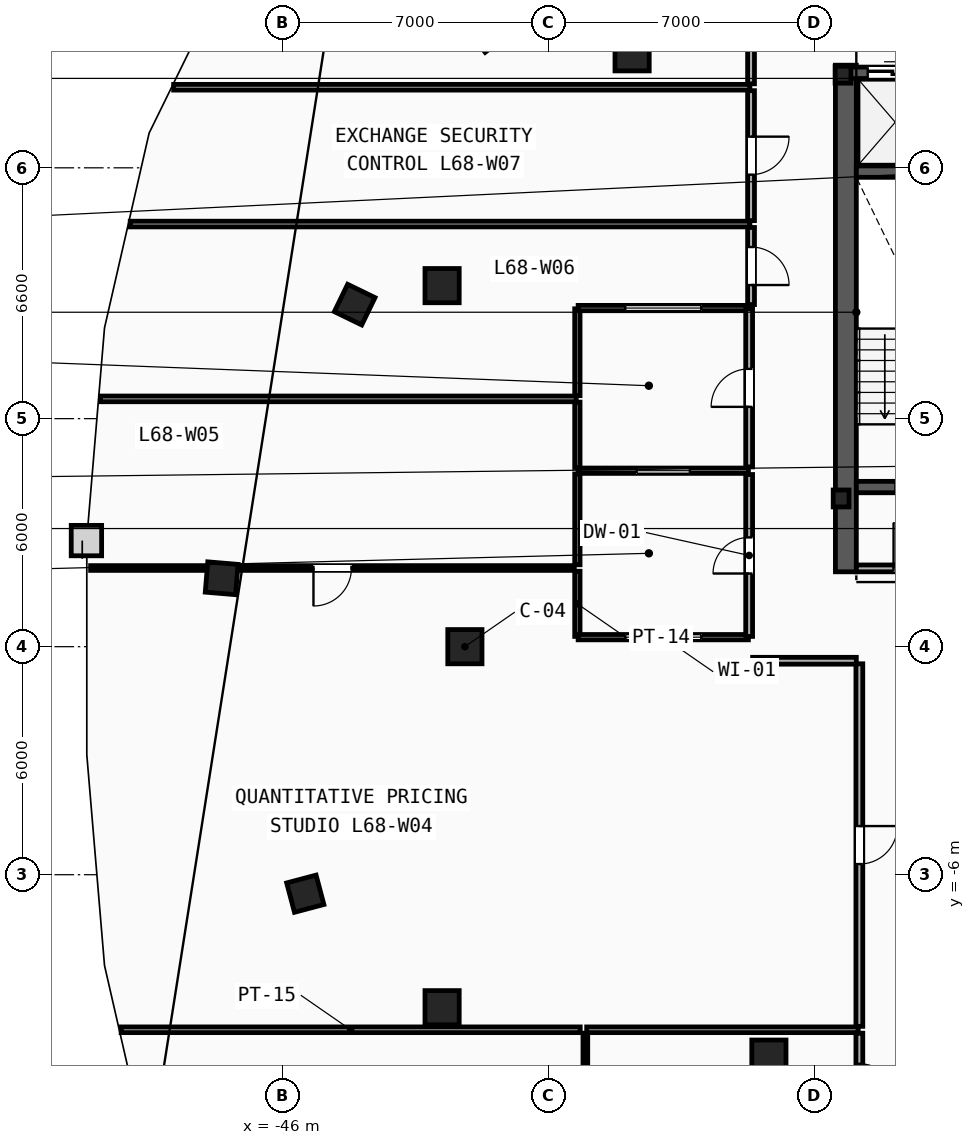
"""IFC4 building model, lengths in metres.
Left out: names, types, materials, properties, quantities, classifications, styles, units other than length and angle.
Written with IfcOpenShell. Run it as: python <this file> out.ifc"""

import sys

from ifc_helpers import new_model, si_unit, direction, frame, frame_2d, origin, origin_2d, place, context, subcontext, project, spatial, rectangle, i_section, extrude, element, fill, save


model = new_model("IFC4")
c1 = context("Model", 3, precision=1e-05, world=origin(), true_north=direction((0.0, 1.0)))
c2 = subcontext(c1, "Body", "Model", "MODEL_VIEW")
j1 = project(units=[si_unit("LENGTHUNIT", "METRE"), si_unit("PLANEANGLEUNIT", "RADIAN")], contexts=[c1])
p1 = place(None, origin())
s1 = spatial("IfcSite", under=j1, at=p1, CompositionType="ELEMENT")
p2 = place(p1, origin())
s2 = spatial("IfcBuilding", under=s1, at=p2, CompositionType="ELEMENT")
p3 = place(p2, frame((0.0, 0.0, 257.6)))
s3 = spatial("IfcBuildingStorey", under=s2, at=p3, CompositionType="ELEMENT", Elevation=257.6)
for number, where, z_axis, x_axis in (
    (1, (-31.3, 3.9, 0.0), (0.0, 0.0, 1.0), (1.0, 0.0, 0.0)),
    (2, (-31.25, 15.05, 0.0), (0.0, 0.0, 1.0), (1.0, 0.0, 0.0)),
):
    element("IfcColumn", number, at=place(p3, frame(where, z_axis=z_axis, x_axis=x_axis)), inside=s3, PredefinedType="COLUMN", context=c2, shape_type="SweptSolid", body=[
        extrude(i_section(OverallWidth=0.416, OverallDepth=0.446, WebThickness=0.039, FlangeThickness=0.063, FilletRadius=0.018, at=origin_2d()), origin(), (0.0, 0.0, 1.0), 3.6),
    ])
for number, where, z_axis, x_axis in (
    (3, (-41.2, 0.0, 0.0), (0.0, 0.0, 1.0), (1.0, 0.0, 0.0)),
    (4, (-41.8, 9.5, 0.0), (0.0, 0.0, 1.0), (1.0, 0.0, 0.0)),
    (5, (-36.8, 15.6, 0.0), (0.0, 0.0, 1.0), (1.0, 0.0, 0.0)),
    (6, (-41.8, -9.5, 0.0), (0.0, 0.0, 1.0), (1.0, 0.0, 0.0)),
    (7, (-33.2, -10.8, 0.0), (0.0, 0.0, 1.0), (1.0, 0.0, 0.0)),
):
    element("IfcColumn", number, at=place(p3, frame(where, z_axis=z_axis, x_axis=x_axis)), inside=s3, PredefinedType="COLUMN", context=c2, shape_type="SweptSolid", body=[
        extrude(rectangle(XDim=0.9, YDim=0.9, at=origin_2d()), origin(), (0.0, 0.0, 1.0), 3.6),
    ])
for number, where, z_axis, x_axis in (
    (8, (-40.6, 16.2, 0.0), (0.0, 0.0, 1.0), (-0.785, -0.619, 0.0)),
    (9, (-44.1, 9.0, 0.0), (0.0, 0.0, 1.0), (-0.437, -0.899, 0.0)),
    (10, (-47.6, 1.8, 0.0), (0.0, 0.0, 1.0), (-0.084, -0.997, 0.0)),
    (11, (-45.4, -6.5, 0.0), (0.0, 0.0, 1.0), (0.256, -0.967, 0.0)),
):
    element("IfcColumn", number, at=place(p3, frame(where, z_axis=z_axis, x_axis=x_axis)), inside=s3, PredefinedType="COLUMN", context=c2, shape_type="SweptSolid", body=[
        extrude(rectangle(XDim=0.8, YDim=0.8, at=origin_2d()), origin(), (0.0, 0.0, 1.0), 3.6),
    ])
p4 = place(p3, frame((-31.175, 1.97, 0.0), z_axis=(0.0, 0.0, 1.0), x_axis=(0.0, 1.0, 0.0)))
e12 = element("IfcWall", 12, at=p4, inside=s3, PredefinedType="SHEAR", context=c2, shape_type="SweptSolid", body=[
    extrude(rectangle(XDim=13.33, YDim=0.55, at=frame_2d((6.665, 0.0))), origin(), (0.0, 0.0, 1.0), 3.34),
])
p5 = place(p3, frame((-30.9, 4.2, 0.0), z_axis=(0.0, 0.0, 1.0), x_axis=(1.0, 0.0, 0.0)))
e13 = element("IfcWall", 13, at=p5, inside=s3, PredefinedType="SHEAR", context=c2, shape_type="SweptSolid", body=[
    extrude(rectangle(XDim=3.16, YDim=0.3, at=frame_2d((1.58, 0.0))), origin(), (0.0, 0.0, 1.0), 3.34),
])
p6 = place(p5, frame((1.03, 0.0, 0.0)))
e14 = element("IfcOpeningElement", 14, at=p6, cuts=e13, PredefinedType="OPENING", context=c2, shape_type="SweptSolid", body=[
    extrude(rectangle(XDim=1.1, YDim=2.15, at=frame_2d((0.55, 1.075))), frame((0.0, 0.16, 0.0), z_axis=(0.0, -1.0, 0.0), x_axis=(1.0, 0.0, 0.0)), (0.0, 0.0, 1.0), 0.32),
])
p7 = place(p3, frame((-30.9, 12.5, 0.0), z_axis=(0.0, 0.0, 1.0), x_axis=(1.0, 0.0, 0.0)))
e15 = element("IfcWall", 15, at=p7, inside=s3, PredefinedType="SHEAR", context=c2, shape_type="SweptSolid", body=[
    extrude(rectangle(XDim=3.16, YDim=0.3, at=frame_2d((1.58, 0.0))), origin(), (0.0, 0.0, 1.0), 3.34),
])
p8 = place(p3, frame((-30.9, 2.06, 0.0), z_axis=(0.0, 0.0, 1.0), x_axis=(1.0, 0.0, 0.0)))
e16 = element("IfcWall", 16, at=p8, inside=s3, PredefinedType="PARTITIONING", context=c2, shape_type="SweptSolid", body=[
    extrude(rectangle(XDim=3.16, YDim=0.18, at=frame_2d((1.58, 0.0))), origin(), (0.0, 0.0, 1.0), 3.34),
])
p9 = place(p8, frame((0.98, 0.0, 0.0)))
e17 = element("IfcOpeningElement", 17, at=p9, cuts=e16, PredefinedType="OPENING", context=c2, shape_type="SweptSolid", body=[
    extrude(rectangle(XDim=1.2, YDim=2.15, at=frame_2d((0.6, 1.075))), frame((0.0, 0.1, 0.0), z_axis=(0.0, -1.0, 0.0), x_axis=(1.0, 0.0, 0.0)), (0.0, 0.0, 1.0), 0.2),
])
p10 = place(p3, frame((-31.2, 15.1, 0.0), z_axis=(0.0, 0.0, 1.0), x_axis=(1.0, 0.0, 0.0)))
e18 = element("IfcWall", 18, at=p10, inside=s3, PredefinedType="SHEAR", context=c2, shape_type="SweptSolid", body=[
    extrude(rectangle(XDim=2.5, YDim=0.3, at=frame_2d((1.25, 0.0))), origin(), (0.0, 0.0, 1.0), 3.34),
])
p11 = place(p10, frame((0.6, 0.0, 0.0)))
e19 = element("IfcOpeningElement", 19, at=p11, cuts=e18, PredefinedType="OPENING", context=c2, shape_type="SweptSolid", body=[
    extrude(rectangle(XDim=1.3, YDim=2.2, at=frame_2d((0.65, 1.1))), frame((0.0, 0.16, 0.0), z_axis=(0.0, -1.0, 0.0), x_axis=(1.0, 0.0, 0.0)), (0.0, 0.0, 1.0), 0.32),
])
p12 = place(p3, frame((-38.24, 0.27, 0.0), z_axis=(0.0, 0.0, 1.0), x_axis=(0.0, 1.0, 0.0)))
e20 = element("IfcWall", 20, at=p12, inside=s3, PredefinedType="PARTITIONING", context=c2, shape_type="SweptSolid", body=[
    extrude(rectangle(XDim=1.715, YDim=0.14, at=frame_2d((0.857, 0.0))), origin(), (0.0, 0.0, 1.0), 3.34),
])
p13 = place(p3, frame((-38.24, 2.155, 0.0), z_axis=(0.0, 0.0, 1.0), x_axis=(0.0, 1.0, 0.0)))
e21 = element("IfcWall", 21, at=p13, inside=s3, PredefinedType="PARTITIONING", context=c2, shape_type="SweptSolid", body=[
    extrude(rectangle(XDim=2.39, YDim=0.14, at=frame_2d((1.195, 0.0))), origin(), (0.0, 0.0, 1.0), 3.34),
])
p14 = place(p3, frame((-38.24, 4.715, 0.0), z_axis=(0.0, 0.0, 1.0), x_axis=(0.0, 1.0, 0.0)))
e22 = element("IfcWall", 22, at=p14, inside=s3, PredefinedType="PARTITIONING", context=c2, shape_type="SweptSolid", body=[
    extrude(rectangle(XDim=1.72, YDim=0.14, at=frame_2d((0.86, 0.0))), origin(), (0.0, 0.0, 1.0), 3.34),
])
p15 = place(p3, frame((-38.24, 6.605, 0.0), z_axis=(0.0, 0.0, 1.0), x_axis=(0.0, 1.0, 0.0)))
e23 = element("IfcWall", 23, at=p15, inside=s3, PredefinedType="PARTITIONING", context=c2, shape_type="SweptSolid", body=[
    extrude(rectangle(XDim=2.285, YDim=0.14, at=frame_2d((1.143, 0.0))), origin(), (0.0, 0.0, 1.0), 3.34),
])
p16 = place(p3, frame((-38.22, 0.25, 0.0), z_axis=(0.0, 0.0, 1.0), x_axis=(1.0, 0.0, 0.0)))
e24 = element("IfcWall", 24, at=p16, inside=s3, PredefinedType="PARTITIONING", context=c2, shape_type="SweptSolid", body=[
    extrude(rectangle(XDim=4.48, YDim=0.14, at=frame_2d((2.24, 0.0))), origin(), (0.0, 0.0, 1.0), 3.34),
])
p17 = place(p16, frame((1.24, 0.0, 1.05)))
e25 = element("IfcOpeningElement", 25, at=p17, cuts=e24, PredefinedType="OPENING", context=c2, shape_type="SweptSolid", body=[
    extrude(rectangle(XDim=2.0, YDim=1.5, at=frame_2d((1.0, 0.75))), frame((0.0, 0.08, 0.0), z_axis=(0.0, -1.0, 0.0), x_axis=(1.0, 0.0, 0.0)), (0.0, 0.0, 1.0), 0.16),
])
p18 = place(p3, frame((-38.22, 4.63, 0.0), z_axis=(0.0, 0.0, 1.0), x_axis=(1.0, 0.0, 0.0)))
e26 = element("IfcWall", 26, at=p18, inside=s3, PredefinedType="PARTITIONING", context=c2, shape_type="SweptSolid", body=[
    extrude(rectangle(XDim=4.48, YDim=0.14, at=frame_2d((2.24, 0.0))), origin(), (0.0, 0.0, 1.0), 3.34),
])
p19 = place(p18, frame((1.54, 0.0, 1.05)))
e27 = element("IfcOpeningElement", 27, at=p19, cuts=e26, PredefinedType="OPENING", context=c2, shape_type="SweptSolid", body=[
    extrude(rectangle(XDim=1.4, YDim=1.5, at=frame_2d((0.7, 0.75))), frame((0.0, 0.08, 0.0), z_axis=(0.0, -1.0, 0.0), x_axis=(1.0, 0.0, 0.0)), (0.0, 0.0, 1.0), 0.16),
])
p20 = place(p3, frame((-38.22, 8.91, 0.0), z_axis=(0.0, 0.0, 1.0), x_axis=(1.0, 0.0, 0.0)))
e28 = element("IfcWall", 28, at=p20, inside=s3, PredefinedType="PARTITIONING", context=c2, shape_type="SweptSolid", body=[
    extrude(rectangle(XDim=4.48, YDim=0.14, at=frame_2d((2.24, 0.0))), origin(), (0.0, 0.0, 1.0), 3.34),
])
p21 = place(p20, frame((1.24, 0.0, 1.05)))
e29 = element("IfcOpeningElement", 29, at=p21, cuts=e28, PredefinedType="OPENING", context=c2, shape_type="SweptSolid", body=[
    extrude(rectangle(XDim=2.0, YDim=1.5, at=frame_2d((1.0, 0.75))), frame((0.0, 0.08, 0.0), z_axis=(0.0, -1.0, 0.0), x_axis=(1.0, 0.0, 0.0)), (0.0, 0.0, 1.0), 0.16),
])
p22 = place(p3, frame((-33.72, 0.27, 0.0), z_axis=(0.0, 0.0, 1.0), x_axis=(0.0, 1.0, 0.0)))
e30 = element("IfcWall", 30, at=p22, inside=s3, PredefinedType="PARTITIONING", context=c2, shape_type="SweptSolid", body=[
    extrude(rectangle(XDim=4.26, YDim=0.18, at=frame_2d((2.13, 0.0))), origin(), (0.0, 0.0, 1.0), 3.34),
])
p23 = place(p22, frame((1.655, 0.0, 0.0)))
e31 = element("IfcOpeningElement", 31, at=p23, cuts=e30, PredefinedType="OPENING", context=c2, shape_type="SweptSolid", body=[
    extrude(rectangle(XDim=0.95, YDim=2.1, at=frame_2d((0.475, 1.05))), frame((0.0, 0.1, 0.0), z_axis=(0.0, -1.0, 0.0), x_axis=(1.0, 0.0, 0.0)), (0.0, 0.0, 1.0), 0.2),
])
p24 = place(p3, frame((-33.72, 4.73, 0.0), z_axis=(0.0, 0.0, 1.0), x_axis=(0.0, 1.0, 0.0)))
e32 = element("IfcWall", 32, at=p24, inside=s3, PredefinedType="PARTITIONING", context=c2, shape_type="SweptSolid", body=[
    extrude(rectangle(XDim=4.16, YDim=0.18, at=frame_2d((2.08, 0.0))), origin(), (0.0, 0.0, 1.0), 3.34),
])
p25 = place(p24, frame((1.58, 0.0, 0.0)))
e33 = element("IfcOpeningElement", 33, at=p25, cuts=e32, PredefinedType="OPENING", context=c2, shape_type="SweptSolid", body=[
    extrude(rectangle(XDim=1.0, YDim=2.15, at=frame_2d((0.5, 1.075))), frame((0.0, 0.1, 0.0), z_axis=(0.0, -1.0, 0.0), x_axis=(1.0, 0.0, 0.0)), (0.0, 0.0, 1.0), 0.2),
])
p26 = place(p3, frame((-50.245, -10.08, 0.0), z_axis=(0.0, 0.0, 1.0), x_axis=(1.0, 0.0, 0.0)))
e34 = element("IfcWall", 34, at=p26, inside=s3, PredefinedType="PARTITIONING", context=c2, shape_type="SweptSolid", body=[
    extrude(rectangle(XDim=12.08, YDim=0.15, at=frame_2d((6.04, 0.0))), origin(), (0.0, 0.0, 1.0), 2.724),
])
p27 = place(p3, frame((-37.995, -10.08, 0.0), z_axis=(0.0, 0.0, 1.0), x_axis=(1.0, 0.0, 0.0)))
e35 = element("IfcWall", 35, at=p27, inside=s3, PredefinedType="PARTITIONING", context=c2, shape_type="SweptSolid", body=[
    extrude(rectangle(XDim=7.145, YDim=0.15, at=frame_2d((3.573, 0.0))), origin(), (0.0, 0.0, 1.0), 2.724),
])
p28 = place(p3, frame((-50.79, 6.52, 0.0), z_axis=(0.0, 0.0, 1.0), x_axis=(1.0, 0.0, 0.0)))
e36 = element("IfcWall", 36, at=p28, inside=s3, PredefinedType="PARTITIONING", context=c2, shape_type="SweptSolid", body=[
    extrude(rectangle(XDim=12.52, YDim=0.15, at=frame_2d((6.26, 0.0))), origin(), (0.0, 0.0, 1.0), 3.34),
])
p29 = place(p3, frame((-50.007, 11.12, 0.0), z_axis=(0.0, 0.0, 1.0), x_axis=(1.0, 0.0, 0.0)))
e37 = element("IfcWall", 37, at=p29, inside=s3, PredefinedType="PARTITIONING", context=c2, shape_type="SweptSolid", body=[
    extrude(rectangle(XDim=16.307, YDim=0.15, at=frame_2d((8.153, 0.0))), origin(), (0.0, 0.0, 1.0), 3.34),
])
p30 = place(p3, frame((-48.864, 14.72, 0.0), z_axis=(0.0, 0.0, 1.0), x_axis=(1.0, 0.0, 0.0)))
e38 = element("IfcWall", 38, at=p30, inside=s3, PredefinedType="PARTITIONING", context=c2, shape_type="SweptSolid", body=[
    extrude(rectangle(XDim=15.164, YDim=0.15, at=frame_2d((7.582, 0.0))), origin(), (0.0, 0.0, 1.0), 3.34),
])
p31 = place(p3, frame((-30.82, -10.17, 0.0), z_axis=(0.0, 0.0, 1.0), x_axis=(0.0, -1.0, 0.0)))
e39 = element("IfcWall", 39, at=p31, inside=s3, PredefinedType="PARTITIONING", context=c2, shape_type="SweptSolid", body=[
    extrude(rectangle(XDim=2.609, YDim=0.18, at=frame_2d((1.304, 0.0))), origin(), (0.0, 0.0, 1.0), 3.34),
])
p32 = place(p31, frame((0.804, 0.0, 0.0)))
e40 = element("IfcOpeningElement", 40, at=p32, cuts=e39, PredefinedType="OPENING", context=c2, shape_type="SweptSolid", body=[
    extrude(rectangle(XDim=1.0, YDim=2.15, at=frame_2d((0.5, 1.075))), frame((0.0, 0.1, 0.0), z_axis=(0.0, -1.0, 0.0), x_axis=(1.0, 0.0, 0.0)), (0.0, 0.0, 1.0), 0.2),
])
p33 = place(p3, frame((-30.82, -0.45, 0.0), z_axis=(0.0, 0.0, 1.0), x_axis=(0.0, -1.0, 0.0)))
e41 = element("IfcWall", 41, at=p33, inside=s3, PredefinedType="PARTITIONING", context=c2, shape_type="SweptSolid", body=[
    extrude(rectangle(XDim=9.54, YDim=0.18, at=frame_2d((4.77, 0.0))), origin(), (0.0, 0.0, 1.0), 3.34),
])
p34 = place(p33, frame((4.27, 0.0, 0.0)))
e42 = element("IfcOpeningElement", 42, at=p34, cuts=e41, PredefinedType="OPENING", context=c2, shape_type="SweptSolid", body=[
    extrude(rectangle(XDim=1.0, YDim=2.15, at=frame_2d((0.5, 1.075))), frame((0.0, 0.1, 0.0), z_axis=(0.0, -1.0, 0.0), x_axis=(1.0, 0.0, 0.0)), (0.0, 0.0, 1.0), 0.2),
])
p35 = place(p3, frame((-33.628, -0.37, 0.0), z_axis=(0.0, 0.0, 1.0), x_axis=(1.0, 0.0, 0.0)))
e43 = element("IfcWall", 43, at=p35, inside=s3, PredefinedType="PARTITIONING", context=c2, shape_type="SweptSolid", body=[
    extrude(rectangle(XDim=2.729, YDim=0.18, at=frame_2d((1.364, 0.0))), origin(), (0.0, 0.0, 1.0), 3.34),
])
p36 = place(p3, frame((-33.67, 11.03, 0.0), z_axis=(0.0, 0.0, 1.0), x_axis=(0.0, -1.0, 0.0)))
e44 = element("IfcWall", 44, at=p36, inside=s3, PredefinedType="PARTITIONING", context=c2, shape_type="SweptSolid", body=[
    extrude(rectangle(XDim=2.029, YDim=0.18, at=frame_2d((1.014, 0.0))), origin(), (0.0, 0.0, 1.0), 3.34),
])
p37 = place(p36, frame((0.514, 0.0, 0.0)))
e45 = element("IfcOpeningElement", 45, at=p37, cuts=e44, PredefinedType="OPENING", context=c2, shape_type="SweptSolid", body=[
    extrude(rectangle(XDim=1.0, YDim=2.15, at=frame_2d((0.5, 1.075))), frame((0.0, 0.1, 0.0), z_axis=(0.0, -1.0, 0.0), x_axis=(1.0, 0.0, 0.0)), (0.0, 0.0, 1.0), 0.2),
])
p38 = place(p3, frame((-33.67, 14.63, 0.0), z_axis=(0.0, 0.0, 1.0), x_axis=(0.0, -1.0, 0.0)))
e46 = element("IfcWall", 46, at=p38, inside=s3, PredefinedType="PARTITIONING", context=c2, shape_type="SweptSolid", body=[
    extrude(rectangle(XDim=3.42, YDim=0.18, at=frame_2d((1.71, 0.0))), origin(), (0.0, 0.0, 1.0), 3.34),
])
p39 = place(p38, frame((1.21, 0.0, 0.0)))
e47 = element("IfcOpeningElement", 47, at=p39, cuts=e46, PredefinedType="OPENING", context=c2, shape_type="SweptSolid", body=[
    extrude(rectangle(XDim=1.0, YDim=2.15, at=frame_2d((0.5, 1.075))), frame((0.0, 0.1, 0.0), z_axis=(0.0, -1.0, 0.0), x_axis=(1.0, 0.0, 0.0)), (0.0, 0.0, 1.0), 0.2),
])
p40 = place(p3, frame((-33.67, 17.428, 0.0), z_axis=(0.0, 0.0, 1.0), x_axis=(0.0, -1.0, 0.0)))
e48 = element("IfcWall", 48, at=p40, inside=s3, PredefinedType="PARTITIONING", context=c2, shape_type="SweptSolid", body=[
    extrude(rectangle(XDim=2.618, YDim=0.18, at=frame_2d((1.309, 0.0))), origin(), (0.0, 0.0, 1.0), 3.34),
])
p41 = place(p3, frame((-38.03, -10.17, 0.0), z_axis=(0.0, 0.0, 1.0), x_axis=(0.0, -1.0, 0.0)))
e49 = element("IfcWall", 49, at=p41, inside=s3, PredefinedType="PARTITIONING", context=c2, shape_type="SweptSolid", body=[
    extrude(rectangle(XDim=14.081, YDim=0.125, at=frame_2d((7.041, 0.0))), origin(), (0.0, 0.0, 1.0), 3.34),
])
p42 = place(p41, frame((6.541, 0.0, 0.0)))
e50 = element("IfcOpeningElement", 50, at=p42, cuts=e49, PredefinedType="OPENING", context=c2, shape_type="SweptSolid", body=[
    extrude(rectangle(XDim=1.0, YDim=2.15, at=frame_2d((0.5, 1.075))), frame((0.0, 0.073, 0.0), z_axis=(0.0, -1.0, 0.0), x_axis=(1.0, 0.0, 0.0)), (0.0, 0.0, 1.0), 0.145),
])
p43 = place(p3, frame((-38.32, 2.07, 0.0), z_axis=(0.0, 0.0, 1.0), x_axis=(-1.0, 0.0, 0.0)))
e51 = element("IfcWall", 51, at=p43, inside=s3, PredefinedType="PARTITIONING", context=c2, shape_type="SweptSolid", body=[
    extrude(rectangle(XDim=12.729, YDim=0.125, at=frame_2d((6.365, 0.0))), origin(), (0.0, 0.0, 1.0), 3.34),
])
p44 = place(p43, frame((5.865, 0.0, 0.0)))
e52 = element("IfcOpeningElement", 52, at=p44, cuts=e51, PredefinedType="OPENING", context=c2, shape_type="SweptSolid", body=[
    extrude(rectangle(XDim=1.0, YDim=2.15, at=frame_2d((0.5, 1.075))), frame((0.0, 0.073, 0.0), z_axis=(0.0, -1.0, 0.0), x_axis=(1.0, 0.0, 0.0)), (0.0, 0.0, 1.0), 0.145),
])
p45 = place(p9, origin())
e53 = element("IfcDoor", 53, at=p45, inside=s3, OperationType="SINGLE_SWING_LEFT", PredefinedType="DOOR", context=c2, shape_type="SweptSolid", body=[
    extrude(rectangle(XDim=1.2, YDim=2.15, at=frame_2d((0.6, 1.075))), frame((0.0, 0.025, 0.0), z_axis=(0.0, -1.0, 0.0), x_axis=(1.0, 0.0, 0.0)), (0.0, 0.0, 1.0), 0.05),
])
fill(e17, e53)
p46 = place(p11, origin())
e54 = element("IfcDoor", 54, at=p46, inside=s3, OperationType="SLIDING_TO_LEFT", PredefinedType="TRAPDOOR", context=c2, shape_type="SweptSolid", body=[
    extrude(rectangle(XDim=1.3, YDim=2.2, at=frame_2d((0.65, 1.1))), frame((0.0, 0.025, 0.0), z_axis=(0.0, -1.0, 0.0), x_axis=(1.0, 0.0, 0.0)), (0.0, 0.0, 1.0), 0.05),
])
fill(e19, e54)
p47 = place(p44, origin())
e55 = element("IfcDoor", 55, at=p47, inside=s3, OperationType="SINGLE_SWING_RIGHT", PredefinedType="DOOR", context=c2, shape_type="SweptSolid", body=[
    extrude(rectangle(XDim=1.0, YDim=2.15, at=frame_2d((0.5, 1.075))), frame((0.0, 0.025, 0.0), z_axis=(0.0, -1.0, 0.0), x_axis=(1.0, 0.0, 0.0)), (0.0, 0.0, 1.0), 0.05),
])
fill(e52, e55)
p48 = place(p34, origin())
e56 = element("IfcDoor", 56, at=p48, inside=s3, OperationType="SINGLE_SWING_LEFT", PredefinedType="DOOR", context=c2, shape_type="SweptSolid", body=[
    extrude(rectangle(XDim=1.0, YDim=2.15, at=frame_2d((0.5, 1.075))), frame((0.0, 0.025, 0.0), z_axis=(0.0, -1.0, 0.0), x_axis=(1.0, 0.0, 0.0)), (0.0, 0.0, 1.0), 0.05),
])
fill(e42, e56)
p49 = place(p23, origin())
e57 = element("IfcDoor", 57, at=p49, inside=s3, OperationType="SINGLE_SWING_LEFT", PredefinedType="DOOR", context=c2, shape_type="SweptSolid", body=[
    extrude(rectangle(XDim=0.95, YDim=2.1, at=frame_2d((0.475, 1.05))), frame((0.0, 0.025, 0.0), z_axis=(0.0, -1.0, 0.0), x_axis=(1.0, 0.0, 0.0)), (0.0, 0.0, 1.0), 0.05),
])
fill(e31, e57)
p50 = place(p25, origin())
e58 = element("IfcDoor", 58, at=p50, inside=s3, OperationType="SINGLE_SWING_LEFT", PredefinedType="DOOR", context=c2, shape_type="SweptSolid", body=[
    extrude(rectangle(XDim=1.0, YDim=2.15, at=frame_2d((0.5, 1.075))), frame((0.0, 0.025, 0.0), z_axis=(0.0, -1.0, 0.0), x_axis=(1.0, 0.0, 0.0)), (0.0, 0.0, 1.0), 0.05),
])
fill(e33, e58)
p51 = place(p39, origin())
e59 = element("IfcDoor", 59, at=p51, inside=s3, OperationType="SINGLE_SWING_LEFT", PredefinedType="DOOR", context=c2, shape_type="SweptSolid", body=[
    extrude(rectangle(XDim=1.0, YDim=2.15, at=frame_2d((0.5, 1.075))), frame((0.0, 0.025, 0.0), z_axis=(0.0, -1.0, 0.0), x_axis=(1.0, 0.0, 0.0)), (0.0, 0.0, 1.0), 0.05),
])
fill(e47, e59)
p52 = place(p32, origin())
e60 = element("IfcDoor", 60, at=p52, inside=s3, OperationType="SINGLE_SWING_RIGHT", PredefinedType="DOOR", context=c2, shape_type="SweptSolid", body=[
    extrude(rectangle(XDim=1.0, YDim=2.15, at=frame_2d((0.5, 1.075))), frame((0.0, 0.025, 0.0), z_axis=(0.0, -1.0, 0.0), x_axis=(1.0, 0.0, 0.0)), (0.0, 0.0, 1.0), 0.05),
])
fill(e40, e60)
p53 = place(p37, origin())
e61 = element("IfcDoor", 61, at=p53, inside=s3, OperationType="SINGLE_SWING_RIGHT", PredefinedType="DOOR", context=c2, shape_type="SweptSolid", body=[
    extrude(rectangle(XDim=1.0, YDim=2.15, at=frame_2d((0.5, 1.075))), frame((0.0, 0.025, 0.0), z_axis=(0.0, -1.0, 0.0), x_axis=(1.0, 0.0, 0.0)), (0.0, 0.0, 1.0), 0.05),
])
fill(e45, e61)
p54 = place(p17, origin())
e62 = element("IfcWindow", 62, at=p54, inside=s3, PartitioningType="SINGLE_PANEL", PredefinedType="WINDOW", context=c2, shape_type="SweptSolid", body=[
    extrude(rectangle(XDim=2.0, YDim=1.5, at=frame_2d((1.0, 0.75))), frame((0.0, 0.03, 0.0), z_axis=(0.0, -1.0, 0.0), x_axis=(1.0, 0.0, 0.0)), (0.0, 0.0, 1.0), 0.06),
])
fill(e25, e62)
p55 = place(p19, origin())
e63 = element("IfcWindow", 63, at=p55, inside=s3, PartitioningType="SINGLE_PANEL", PredefinedType="WINDOW", context=c2, shape_type="SweptSolid", body=[
    extrude(rectangle(XDim=1.4, YDim=1.5, at=frame_2d((0.7, 0.75))), frame((0.0, 0.03, 0.0), z_axis=(0.0, -1.0, 0.0), x_axis=(1.0, 0.0, 0.0)), (0.0, 0.0, 1.0), 0.06),
])
fill(e27, e63)
p56 = place(p21, origin())
e64 = element("IfcWindow", 64, at=p56, inside=s3, PartitioningType="SINGLE_PANEL", PredefinedType="WINDOW", context=c2, shape_type="SweptSolid", body=[
    extrude(rectangle(XDim=2.0, YDim=1.5, at=frame_2d((1.0, 0.75))), frame((0.0, 0.03, 0.0), z_axis=(0.0, -1.0, 0.0), x_axis=(1.0, 0.0, 0.0)), (0.0, 0.0, 1.0), 0.06),
])
fill(e29, e64)
save(model, sys.argv[1])
